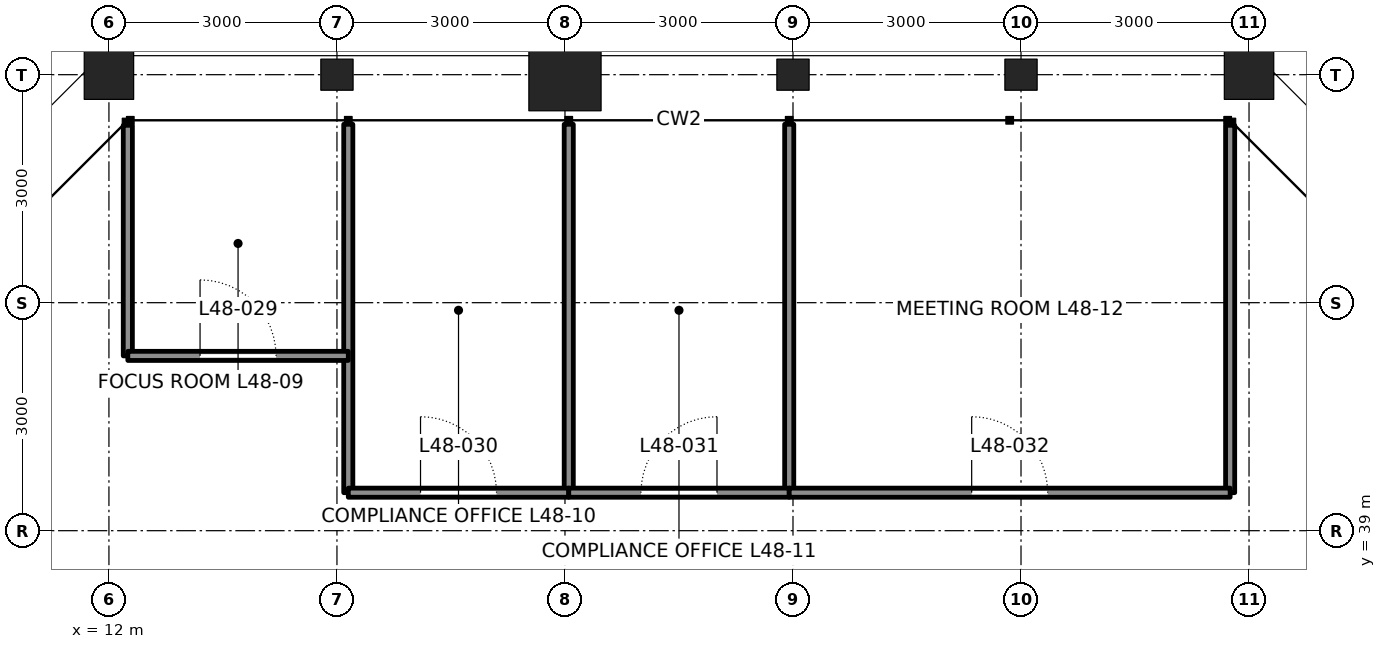
"""IFC4 building model, lengths in metres.
Left out: names, types, materials, properties, quantities, classifications, styles, units other than length and angle.
Written with IfcOpenShell. Run it as: python <this file> out.ifc"""

import sys

from ifc_helpers import new_model, si_unit, direction, frame, frame_2d, origin, origin_2d, place, context, subcontext, project, spatial, rectangle, hollow_rectangle, i_section, extrude, element, fill, save


model = new_model("IFC4")
c1 = context("Model", 3, precision=1e-05, world=origin(), true_north=direction((0.0, 1.0)))
c2 = subcontext(c1, "Body", "Model", "MODEL_VIEW")
j1 = project(units=[si_unit("LENGTHUNIT", "METRE"), si_unit("PLANEANGLEUNIT", "RADIAN")], contexts=[c1])
p1 = place(None, origin())
s1 = spatial("IfcSite", under=j1, at=p1, CompositionType="ELEMENT")
p2 = place(p1, origin())
s2 = spatial("IfcBuilding", under=s1, at=p2, CompositionType="ELEMENT")
p3 = place(p2, frame((0.0, 0.0, 218.1)))
s3 = spatial("IfcBuildingStorey", under=s2, at=p3, CompositionType="ELEMENT", Elevation=218.1)
p4 = place(p3, frame((27.0, 45.0, 0.0), z_axis=(0.0, 0.0, 1.0), x_axis=(0.0, 1.0, 0.0)))
e1 = element("IfcColumn", 1, at=p4, inside=s3, PredefinedType="COLUMN", context=c2, shape_type="SweptSolid", body=[
    extrude(hollow_rectangle(XDim=0.65, YDim=0.65, WallThickness=0.065, at=origin_2d()), origin(), (0.0, 0.0, 1.0), 4.2),
])
for number, where, z_axis, x_axis in (
    (2, (24.0, 45.0, 0.0), (0.0, 0.0, 1.0), (0.0, 1.0, 0.0)),
    (3, (21.0, 45.0, 0.0), (0.0, 0.0, 1.0), (0.0, 1.0, 0.0)),
):
    element("IfcColumn", number, at=place(p3, frame(where, z_axis=z_axis, x_axis=x_axis)), inside=s3, PredefinedType="COLUMN", context=c2, shape_type="SweptSolid", body=[
        extrude(i_section(OverallWidth=0.409, OverallDepth=0.424, WebThickness=0.033, FlangeThickness=0.052, at=origin_2d()), origin(), (0.0, 0.0, 1.0), 4.2),
    ])
p5 = place(p3, frame((18.0, 45.0, 0.0), z_axis=(0.0, 0.0, 1.0), x_axis=(0.0, 1.0, 0.0)))
e4 = element("IfcColumn", 4, at=p5, inside=s3, PredefinedType="COLUMN", context=c2, shape_type="SweptSolid", body=[
    extrude(hollow_rectangle(XDim=0.95, YDim=0.95, WallThickness=0.11, at=origin_2d()), origin(), (0.0, 0.0, 1.0), 4.2),
])
p6 = place(p3, frame((15.0, 45.0, 0.0), z_axis=(0.0, 0.0, 1.0), x_axis=(0.0, 1.0, 0.0)))
e5 = element("IfcColumn", 5, at=p6, inside=s3, PredefinedType="COLUMN", context=c2, shape_type="SweptSolid", body=[
    extrude(i_section(OverallWidth=0.409, OverallDepth=0.424, WebThickness=0.033, FlangeThickness=0.052, at=origin_2d()), origin(), (0.0, 0.0, 1.0), 4.2),
])
p7 = place(p3, frame((12.0, 45.0, 0.0), z_axis=(0.0, 0.0, 1.0), x_axis=(0.0, 1.0, 0.0)))
e6 = element("IfcColumn", 6, at=p7, inside=s3, PredefinedType="COLUMN", context=c2, shape_type="SweptSolid", body=[
    extrude(hollow_rectangle(XDim=0.65, YDim=0.65, WallThickness=0.065, at=origin_2d()), origin(), (0.0, 0.0, 1.0), 4.2),
])
p8 = place(p3, frame((12.249, 44.334, 0.0), z_axis=(0.0, 0.0, 1.0), x_axis=(0.0, -1.0, 0.0)))
e7 = element("IfcWall", 7, at=p8, inside=s3, PredefinedType="PARTITIONING", context=c2, shape_type="SweptSolid", body=[
    extrude(rectangle(XDim=3.034, YDim=0.12, at=frame_2d((1.517, 0.0))), origin(), (0.0, 0.0, 1.0), 4.04),
])
p9 = place(p3, frame((15.149, 44.347, 0.0), z_axis=(0.0, 0.0, 1.0), x_axis=(0.0, -1.0, 0.0)))
e8 = element("IfcWall", 8, at=p9, inside=s3, PredefinedType="PARTITIONING", context=c2, shape_type="SweptSolid", body=[
    extrude(rectangle(XDim=4.847, YDim=0.12, at=frame_2d((2.424, 0.0))), origin(), (0.0, 0.0, 1.0), 4.04),
])
for number, where, z_axis, x_axis in (
    (9, (18.05, 44.347, 0.0), (0.0, 0.0, 1.0), (0.0, -1.0, 0.0)),
    (10, (20.95, 44.347, 0.0), (0.0, 0.0, 1.0), (0.0, -1.0, 0.0)),
):
    element("IfcWall", number, at=place(p3, frame(where, z_axis=z_axis, x_axis=x_axis)), inside=s3, PredefinedType="PARTITIONING", context=c2, shape_type="SweptSolid", body=[
        extrude(rectangle(XDim=4.847, YDim=0.12, at=frame_2d((2.424, 0.0))), origin(), (0.0, 0.0, 1.0), 3.357),
    ])
p10 = place(p3, frame((26.751, 44.334, 0.0), z_axis=(0.0, 0.0, 1.0), x_axis=(0.0, -1.0, 0.0)))
e11 = element("IfcWall", 11, at=p10, inside=s3, PredefinedType="PARTITIONING", context=c2, shape_type="SweptSolid", body=[
    extrude(rectangle(XDim=4.834, YDim=0.12, at=frame_2d((2.417, 0.0))), origin(), (0.0, 0.0, 1.0), 4.04),
])
p11 = place(p3, frame((12.249, 41.3, 0.0), z_axis=(0.0, 0.0, 1.0), x_axis=(1.0, 0.0, 0.0)))
e12 = element("IfcWall", 12, at=p11, inside=s3, PredefinedType="PARTITIONING", context=c2, shape_type="SweptSolid", body=[
    extrude(rectangle(XDim=2.901, YDim=0.12, at=frame_2d((1.45, 0.0))), origin(), (0.0, 0.0, 1.0), 4.04),
])
p12 = place(p11, frame((0.95, 0.0, 0.0)))
e13 = element("IfcOpeningElement", 13, at=p12, cuts=e12, PredefinedType="OPENING", context=c2, shape_type="SweptSolid", body=[
    extrude(rectangle(XDim=1.0, YDim=2.4, at=frame_2d((0.5, 1.2))), frame((0.0, 0.07, 0.0), z_axis=(0.0, -1.0, 0.0), x_axis=(1.0, 0.0, 0.0)), (0.0, 0.0, 1.0), 0.14),
])
p13 = place(p3, frame((15.149, 39.5, 0.0), z_axis=(0.0, 0.0, 1.0), x_axis=(1.0, 0.0, 0.0)))
e14 = element("IfcWall", 14, at=p13, inside=s3, PredefinedType="PARTITIONING", context=c2, shape_type="SweptSolid", body=[
    extrude(rectangle(XDim=2.901, YDim=0.12, at=frame_2d((1.45, 0.0))), origin(), (0.0, 0.0, 1.0), 4.04),
])
p14 = place(p13, frame((0.95, 0.0, 0.0)))
e15 = element("IfcOpeningElement", 15, at=p14, cuts=e14, PredefinedType="OPENING", context=c2, shape_type="SweptSolid", body=[
    extrude(rectangle(XDim=1.0, YDim=2.4, at=frame_2d((0.5, 1.2))), frame((0.0, 0.07, 0.0), z_axis=(0.0, -1.0, 0.0), x_axis=(1.0, 0.0, 0.0)), (0.0, 0.0, 1.0), 0.14),
])
p15 = place(p3, frame((18.05, 39.5, 0.0), z_axis=(0.0, 0.0, 1.0), x_axis=(1.0, 0.0, 0.0)))
e16 = element("IfcWall", 16, at=p15, inside=s3, PredefinedType="PARTITIONING", context=c2, shape_type="SweptSolid", body=[
    extrude(rectangle(XDim=2.9, YDim=0.12, at=frame_2d((1.45, 0.0))), origin(), (0.0, 0.0, 1.0), 4.04),
])
p16 = place(p15, frame((0.95, 0.0, 0.0)))
e17 = element("IfcOpeningElement", 17, at=p16, cuts=e16, PredefinedType="OPENING", context=c2, shape_type="SweptSolid", body=[
    extrude(rectangle(XDim=1.0, YDim=2.4, at=frame_2d((0.5, 1.2))), frame((0.0, 0.07, 0.0), z_axis=(0.0, -1.0, 0.0), x_axis=(1.0, 0.0, 0.0)), (0.0, 0.0, 1.0), 0.14),
])
p17 = place(p3, frame((20.95, 39.5, 0.0), z_axis=(0.0, 0.0, 1.0), x_axis=(1.0, 0.0, 0.0)))
e18 = element("IfcWall", 18, at=p17, inside=s3, PredefinedType="PARTITIONING", context=c2, shape_type="SweptSolid", body=[
    extrude(rectangle(XDim=5.801, YDim=0.12, at=frame_2d((2.901, 0.0))), origin(), (0.0, 0.0, 1.0), 4.04),
])
p18 = place(p17, frame((2.401, 0.0, 0.0)))
e19 = element("IfcOpeningElement", 19, at=p18, cuts=e18, PredefinedType="OPENING", context=c2, shape_type="SweptSolid", body=[
    extrude(rectangle(XDim=1.0, YDim=2.4, at=frame_2d((0.5, 1.2))), frame((0.0, 0.07, 0.0), z_axis=(0.0, -1.0, 0.0), x_axis=(1.0, 0.0, 0.0)), (0.0, 0.0, 1.0), 0.14),
])
p19 = place(p12, origin())
e20 = element("IfcDoor", 20, at=p19, inside=s3, OperationType="SINGLE_SWING_LEFT", PredefinedType="DOOR", context=c2, shape_type="SweptSolid", body=[
    extrude(rectangle(XDim=1.0, YDim=2.4, at=frame_2d((0.5, 1.2))), frame((0.0, 0.025, 0.0), z_axis=(0.0, -1.0, 0.0), x_axis=(1.0, 0.0, 0.0)), (0.0, 0.0, 1.0), 0.05),
])
fill(e13, e20)
p20 = place(p14, origin())
e21 = element("IfcDoor", 21, at=p20, inside=s3, OperationType="SINGLE_SWING_LEFT", PredefinedType="DOOR", context=c2, shape_type="SweptSolid", body=[
    extrude(rectangle(XDim=1.0, YDim=2.4, at=frame_2d((0.5, 1.2))), frame((0.0, 0.025, 0.0), z_axis=(0.0, -1.0, 0.0), x_axis=(1.0, 0.0, 0.0)), (0.0, 0.0, 1.0), 0.05),
])
fill(e15, e21)
p21 = place(p16, origin())
e22 = element("IfcDoor", 22, at=p21, inside=s3, OperationType="SINGLE_SWING_RIGHT", PredefinedType="DOOR", context=c2, shape_type="SweptSolid", body=[
    extrude(rectangle(XDim=1.0, YDim=2.4, at=frame_2d((0.5, 1.2))), frame((0.0, 0.025, 0.0), z_axis=(0.0, -1.0, 0.0), x_axis=(1.0, 0.0, 0.0)), (0.0, 0.0, 1.0), 0.05),
])
fill(e17, e22)
p22 = place(p18, origin())
e23 = element("IfcDoor", 23, at=p22, inside=s3, OperationType="SINGLE_SWING_LEFT", PredefinedType="DOOR", context=c2, shape_type="SweptSolid", body=[
    extrude(rectangle(XDim=1.0, YDim=2.4, at=frame_2d((0.5, 1.2))), frame((0.0, 0.025, 0.0), z_axis=(0.0, -1.0, 0.0), x_axis=(1.0, 0.0, 0.0)), (0.0, 0.0, 1.0), 0.05),
])
fill(e19, e23)
save(model, sys.argv[1])
